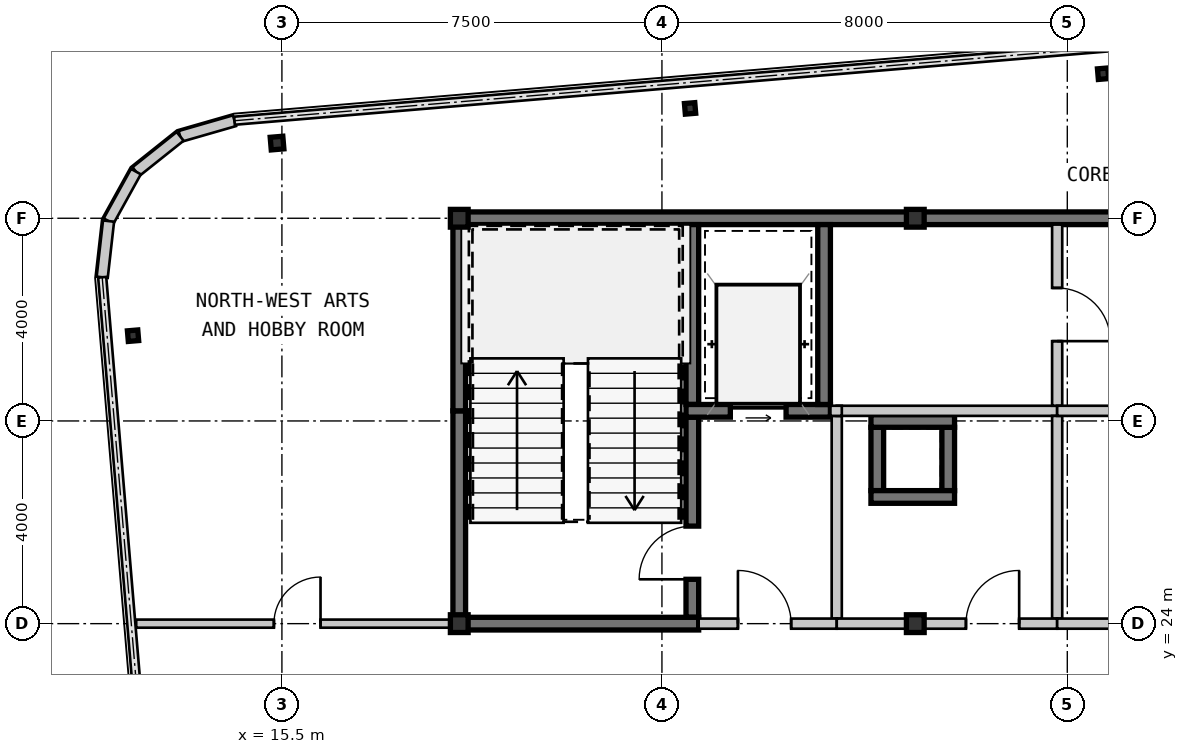
"""IFC4 building model, lengths in metres.
Left out: names, types, materials, properties, quantities, classifications, styles, units other than length and angle.
Written with IfcOpenShell. Run it as: python <this file> out.ifc"""

import sys

from ifc_helpers import new_model, si_unit, direction, frame, frame_2d, origin, origin_2d, place, context, subcontext, project, spatial, rectangle, hollow_rectangle, i_section, extrude, source, transform, mapped, element, fill, save


model = new_model("IFC4")
c1 = context("Model", 3, precision=1e-05, world=origin(), true_north=direction((0.0, 1.0)))
c2 = subcontext(c1, "Body", "Model", "MODEL_VIEW")
j1 = project(units=[si_unit("LENGTHUNIT", "METRE"), si_unit("PLANEANGLEUNIT", "RADIAN")], contexts=[c1])
p1 = place(None, origin())
s1 = spatial("IfcSite", under=j1, at=p1, CompositionType="ELEMENT")
p2 = place(p1, origin())
s2 = spatial("IfcBuilding", under=s1, at=p2, CompositionType="ELEMENT")
p3 = place(p2, frame((0.0, 0.0, 197.75)))
s3 = spatial("IfcBuildingStorey", under=s2, at=p3, CompositionType="ELEMENT", Elevation=197.75)
m1 = source(origin(), c2, "Body", "SweptSolid", [
    extrude(hollow_rectangle(XDim=0.35, YDim=0.35, WallThickness=0.016, at=origin_2d()), origin(), (0.0, 0.0, 1.0), 3.15),
])
for number, where, z_axis, x_axis in (
    (1, (19.0, 24.0, 0.0), (0.0, 0.0, 1.0), (1.0, 0.0, 0.0)),
    (2, (28.0, 24.0, 0.0), (0.0, 0.0, 1.0), (1.0, 0.0, 0.0)),
    (3, (19.0, 32.0, 0.0), (0.0, 0.0, 1.0), (1.0, 0.0, 0.0)),
    (4, (28.0, 32.0, 0.0), (0.0, 0.0, 1.0), (1.0, 0.0, 0.0)),
):
    element("IfcColumn", number, at=place(p3, frame(where, z_axis=z_axis, x_axis=x_axis)), inside=s3, PredefinedType="COLUMN", context=c2, shape_type="MappedRepresentation", body=[
        mapped(m1, transform((0.0, 0.0, 0.0), scale=1.0)),
    ])
m2 = source(origin(), c2, "Body", "SweptSolid", [
    extrude(hollow_rectangle(XDim=0.25, YDim=0.25, WallThickness=0.01, at=origin_2d()), origin(), (0.0, 0.0, 1.0), 3.15),
])
p4 = place(p3, frame((15.404, 33.484, 0.0), z_axis=(0.0, 0.0, 1.0), x_axis=(0.99649285925, 0.083677843332, 0.0)))
e5 = element("IfcColumn", 5, at=p4, inside=s3, PredefinedType="COLUMN", context=c2, shape_type="MappedRepresentation", body=[
    mapped(m2, transform((0.0, 0.0, 0.0), scale=1.0)),
])
m3 = source(origin(), c2, "Body", "SweptSolid", [
    extrude(i_section(OverallWidth=0.205, OverallDepth=0.21, WebThickness=0.009, FlangeThickness=0.014, at=origin_2d()), origin(), (0.0, 0.0, 1.0), 3.15),
])
for number, where, z_axis, x_axis in (
    (6, (23.555, 34.168, 0.0), (0.0, 0.0, 1.0), (0.996, 0.084, 0.0)),
    (7, (31.706, 34.853, 0.0), (0.0, 0.0, 1.0), (0.996, 0.084, 0.0)),
    (8, (12.562, 29.682, 0.0), (0.0, 0.0, 1.0), (0.996, 0.084, 0.0)),
):
    element("IfcColumn", number, at=place(p3, frame(where, z_axis=z_axis, x_axis=x_axis)), inside=s3, PredefinedType="COLUMN", context=c2, shape_type="MappedRepresentation", body=[
        mapped(m3, transform((0.0, 0.0, 0.0), scale=1.0)),
    ])
m4 = source(origin(), c2, "Body", "SweptSolid", [
    extrude(rectangle(XDim=1.116, YDim=0.22, at=frame_2d((0.558, 0.0))), origin(), (0.0, 0.0, 1.0), 2.93),
])
p5 = place(p3, frame((14.564, 33.925, 0.0), z_axis=(0.0, 0.0, 1.0), x_axis=(-0.961010464297, -0.276512002475, 0.0)))
e9 = element("IfcWall", 9, at=p5, inside=s3, PredefinedType="SOLIDWALL", context=c2, shape_type="MappedRepresentation", body=[
    mapped(m4, transform((0.0, 0.0, 0.0), scale=1.0)),
])
m5 = source(origin(), c2, "Body", "SweptSolid", [
    extrude(rectangle(XDim=1.116, YDim=0.22, at=frame_2d((0.558, 0.0))), origin(), (0.0, 0.0, 1.0), 2.93),
])
p6 = place(p3, frame((13.491, 33.616, 0.0), z_axis=(0.0, 0.0, 1.0), x_axis=(-0.782062884215, -0.623199522732, 0.0)))
e10 = element("IfcWall", 10, at=p6, inside=s3, PredefinedType="SOLIDWALL", context=c2, shape_type="MappedRepresentation", body=[
    mapped(m5, transform((0.0, 0.0, 0.0), scale=1.0)),
])
for number, where, z_axis, x_axis in (
    (11, (12.619, 32.921, 0.0), (0.0, 0.0, 1.0), (-0.484, -0.875, 0.0)),
    (12, (12.079, 31.944, 0.0), (0.0, 0.0, 1.0), (-0.112, -0.994, 0.0)),
):
    element("IfcWall", number, at=place(p3, frame(where, z_axis=z_axis, x_axis=x_axis)), inside=s3, PredefinedType="SOLIDWALL", context=c2, shape_type="MappedRepresentation", body=[
        mapped(m4, transform((0.0, 0.0, 0.0), scale=1.0)),
    ])
m6 = source(origin(), c2, "Body", "SweptSolid", [
    extrude(rectangle(XDim=9.125, YDim=0.25, at=frame_2d((4.562, 0.0))), origin(), (0.0, 0.0, 1.0), 2.93),
])
p7 = place(p3, frame((18.875, 32.0, 0.0), z_axis=(0.0, 0.0, 1.0), x_axis=(1.0, 0.0, 0.0)))
e13 = element("IfcWall", 13, at=p7, inside=s3, PredefinedType="SHEAR", context=c2, shape_type="MappedRepresentation", body=[
    mapped(m6, transform((0.0, 0.0, 0.0), scale=1.0)),
])
m7 = source(origin(), c2, "Body", "SweptSolid", [
    extrude(rectangle(XDim=11.2, YDim=0.25, at=frame_2d((5.6, 0.0))), origin(), (0.0, 0.0, 1.0), 2.93),
])
p8 = place(p3, frame((28.0, 32.0, 0.0), z_axis=(0.0, 0.0, 1.0), x_axis=(1.0, 0.0, 0.0)))
e14 = element("IfcWall", 14, at=p8, inside=s3, PredefinedType="SHEAR", context=c2, shape_type="MappedRepresentation", body=[
    mapped(m7, transform((0.0, 0.0, 0.0), scale=1.0)),
])
m8 = source(origin(), c2, "Body", "SweptSolid", [
    extrude(rectangle(XDim=4.075, YDim=0.25, at=frame_2d((2.038, 0.0))), origin(), (0.0, 0.0, 1.0), 2.93),
])
p9 = place(p3, frame((19.0, 24.125, 0.0), z_axis=(0.0, 0.0, 1.0), x_axis=(0.0, 1.0, 0.0)))
e15 = element("IfcWall", 15, at=p9, inside=s3, PredefinedType="SHEAR", context=c2, shape_type="MappedRepresentation", body=[
    mapped(m8, transform((0.0, 0.0, 0.0), scale=1.0)),
])
m9 = source(origin(), c2, "Body", "SweptSolid", [
    extrude(rectangle(XDim=3.675, YDim=0.25, at=frame_2d((1.837, 0.0))), origin(), (0.0, 0.0, 1.0), 2.93),
])
p10 = place(p3, frame((19.0, 28.2, 0.0), z_axis=(0.0, 0.0, 1.0), x_axis=(0.0, 1.0, 0.0)))
e16 = element("IfcWall", 16, at=p10, inside=s3, PredefinedType="SHEAR", context=c2, shape_type="MappedRepresentation", body=[
    mapped(m9, transform((0.0, 0.0, 0.0), scale=1.0)),
])
m10 = source(origin(), c2, "Body", "SweptSolid", [
    extrude(rectangle(XDim=3.55, YDim=0.25, at=frame_2d((1.775, 0.0))), origin(), (0.0, 0.0, 1.0), 2.93),
])
p11 = place(p3, frame((23.6, 28.325, 0.0), z_axis=(0.0, 0.0, 1.0), x_axis=(0.0, 1.0, 0.0)))
e17 = element("IfcWall", 17, at=p11, inside=s3, PredefinedType="SHEAR", context=c2, shape_type="MappedRepresentation", body=[
    mapped(m10, transform((0.0, 0.0, 0.0), scale=1.0)),
])
m11 = source(origin(), c2, "Body", "SweptSolid", [
    extrude(rectangle(XDim=3.95, YDim=0.25, at=frame_2d((1.975, 0.0))), origin(), (0.0, 0.0, 1.0), 2.93),
])
p12 = place(p3, frame((23.6, 24.125, 0.0), z_axis=(0.0, 0.0, 1.0), x_axis=(0.0, 1.0, 0.0)))
e18 = element("IfcWall", 18, at=p12, inside=s3, PredefinedType="SHEAR", context=c2, shape_type="MappedRepresentation", body=[
    mapped(m11, transform((0.0, 0.0, 0.0), scale=1.0)),
])
m12 = source(origin(), c2, "Body", "SweptSolid", [
    extrude(rectangle(XDim=1.05, YDim=2.1, at=frame_2d((0.525, 1.05))), frame((0.0, 0.135, 0.0), z_axis=(0.0, -1.0, 0.0), x_axis=(1.0, 0.0, 0.0)), (0.0, 0.0, 1.0), 0.27),
])
p13 = place(p12, frame((0.75, 0.0, 0.0)))
e19 = element("IfcOpeningElement", 19, at=p13, cuts=e18, PredefinedType="OPENING", context=c2, shape_type="MappedRepresentation", body=[
    mapped(m12, transform((0.0, 0.0, 0.0), scale=1.0)),
])
m13 = source(origin(), c2, "Body", "SweptSolid", [
    extrude(rectangle(XDim=4.85, YDim=0.25, at=frame_2d((2.425, 0.0))), origin(), (0.0, 0.0, 1.0), 2.93),
])
p14 = place(p3, frame((18.875, 24.0, 0.0), z_axis=(0.0, 0.0, 1.0), x_axis=(1.0, 0.0, 0.0)))
e20 = element("IfcWall", 20, at=p14, inside=s3, PredefinedType="SHEAR", context=c2, shape_type="MappedRepresentation", body=[
    mapped(m13, transform((0.0, 0.0, 0.0), scale=1.0)),
])
m14 = source(origin(), c2, "Body", "SweptSolid", [
    extrude(rectangle(XDim=2.85, YDim=0.25, at=frame_2d((1.425, 0.0))), origin(), (0.0, 0.0, 1.0), 2.93),
])
p15 = place(p3, frame((23.475, 28.2, 0.0), z_axis=(0.0, 0.0, 1.0), x_axis=(1.0, 0.0, 0.0)))
e21 = element("IfcWall", 21, at=p15, inside=s3, PredefinedType="SHEAR", context=c2, shape_type="MappedRepresentation", body=[
    mapped(m14, transform((0.0, 0.0, 0.0), scale=1.0)),
])
m15 = source(origin(), c2, "Body", "SweptSolid", [
    extrude(rectangle(XDim=1.1, YDim=2.15, at=frame_2d((0.55, 1.075))), frame((0.0, 0.135, 0.0), z_axis=(0.0, -1.0, 0.0), x_axis=(1.0, 0.0, 0.0)), (0.0, 0.0, 1.0), 0.27),
])
p16 = place(p15, frame((0.875, 0.0, 0.0)))
e22 = element("IfcOpeningElement", 22, at=p16, cuts=e21, PredefinedType="OPENING", context=c2, shape_type="MappedRepresentation", body=[
    mapped(m15, transform((0.0, 0.0, 0.0), scale=1.0)),
])
p17 = place(p3, frame((26.2, 28.325, 0.0), z_axis=(0.0, 0.0, 1.0), x_axis=(0.0, 1.0, 0.0)))
e23 = element("IfcWall", 23, at=p17, inside=s3, PredefinedType="SHEAR", context=c2, shape_type="MappedRepresentation", body=[
    mapped(m10, transform((0.0, 0.0, 0.0), scale=1.0)),
])
m16 = source(origin(), c2, "Body", "SweptSolid", [
    extrude(rectangle(XDim=4.0, YDim=0.2, at=frame_2d((2.0, 0.0))), origin(), (0.0, 0.0, 1.0), 2.93),
])
p18 = place(p3, frame((26.45, 24.1, 0.0), z_axis=(0.0, 0.0, 1.0), x_axis=(0.0, 1.0, 0.0)))
e24 = element("IfcWall", 24, at=p18, inside=s3, PredefinedType="SOLIDWALL", context=c2, shape_type="MappedRepresentation", body=[
    mapped(m16, transform((0.0, 0.0, 0.0), scale=1.0)),
])
m17 = source(origin(), c2, "Body", "SweptSolid", [
    extrude(rectangle(XDim=2.725, YDim=0.2, at=frame_2d((1.362, 0.0))), origin(), (0.0, 0.0, 1.0), 2.47),
])
p19 = place(p3, frame((23.725, 24.0, 0.0), z_axis=(0.0, 0.0, 1.0), x_axis=(1.0, 0.0, 0.0)))
e25 = element("IfcWall", 25, at=p19, inside=s3, PredefinedType="SOLIDWALL", context=c2, shape_type="MappedRepresentation", body=[
    mapped(m17, transform((0.0, 0.0, 0.0), scale=1.0)),
])
m18 = source(origin(), c2, "Body", "SweptSolid", [
    extrude(rectangle(XDim=1.05, YDim=2.1, at=frame_2d((0.525, 1.05))), frame((0.0, 0.11, 0.0), z_axis=(0.0, -1.0, 0.0), x_axis=(1.0, 0.0, 0.0)), (0.0, 0.0, 1.0), 0.22),
])
p20 = place(p19, frame((0.775, 0.0, 0.0)))
e26 = element("IfcOpeningElement", 26, at=p20, cuts=e25, PredefinedType="OPENING", context=c2, shape_type="MappedRepresentation", body=[
    mapped(m18, transform((0.0, 0.0, 0.0), scale=1.0)),
])
m19 = source(origin(), c2, "Body", "SweptSolid", [
    extrude(rectangle(XDim=1.25, YDim=0.25, at=frame_2d((0.625, 0.0))), origin(), (0.0, 0.0, 1.0), 2.93),
])
for number, where, z_axis, x_axis in (
    (27, (28.65, 26.625, 0.0), (0.0, 0.0, 1.0), (0.0, 1.0, 0.0)),
    (28, (27.25, 27.875, 0.0), (0.0, 0.0, 1.0), (0.0, -1.0, 0.0)),
):
    element("IfcWall", number, at=place(p3, frame(where, z_axis=z_axis, x_axis=x_axis)), inside=s3, PredefinedType="SHEAR", context=c2, shape_type="MappedRepresentation", body=[
        mapped(m19, transform((0.0, 0.0, 0.0), scale=1.0)),
    ])
m20 = source(origin(), c2, "Body", "SweptSolid", [
    extrude(rectangle(XDim=1.65, YDim=0.25, at=frame_2d((0.825, 0.0))), origin(), (0.0, 0.0, 1.0), 2.93),
])
for number, where, z_axis, x_axis in (
    (29, (28.775, 28.0, 0.0), (0.0, 0.0, 1.0), (-1.0, 0.0, 0.0)),
    (30, (27.125, 26.5, 0.0), (0.0, 0.0, 1.0), (1.0, 0.0, 0.0)),
):
    element("IfcWall", number, at=place(p3, frame(where, z_axis=z_axis, x_axis=x_axis)), inside=s3, PredefinedType="SHEAR", context=c2, shape_type="MappedRepresentation", body=[
        mapped(m20, transform((0.0, 0.0, 0.0), scale=1.0)),
    ])
m21 = source(origin(), c2, "Body", "SweptSolid", [
    extrude(rectangle(XDim=4.35, YDim=0.2, at=frame_2d((2.175, 0.0))), origin(), (0.0, 0.0, 1.0), 2.93),
])
p21 = place(p3, frame((26.45, 28.2, 0.0), z_axis=(0.0, 0.0, 1.0), x_axis=(1.0, 0.0, 0.0)))
e31 = element("IfcWall", 31, at=p21, inside=s3, PredefinedType="SOLIDWALL", context=c2, shape_type="MappedRepresentation", body=[
    mapped(m21, transform((0.0, 0.0, 0.0), scale=1.0)),
])
p22 = place(p3, frame((30.8, 28.1, 0.0), z_axis=(0.0, 0.0, 1.0), x_axis=(0.0, -1.0, 0.0)))
e32 = element("IfcWall", 32, at=p22, inside=s3, PredefinedType="SOLIDWALL", context=c2, shape_type="MappedRepresentation", body=[
    mapped(m16, transform((0.0, 0.0, 0.0), scale=1.0)),
])
m22 = source(origin(), c2, "Body", "SweptSolid", [
    extrude(rectangle(XDim=4.35, YDim=0.2, at=frame_2d((2.175, 0.0))), origin(), (0.0, 0.0, 1.0), 2.47),
])
p23 = place(p3, frame((30.8, 24.0, 0.0), z_axis=(0.0, 0.0, 1.0), x_axis=(-1.0, 0.0, 0.0)))
e33 = element("IfcWall", 33, at=p23, inside=s3, PredefinedType="SOLIDWALL", context=c2, shape_type="MappedRepresentation", body=[
    mapped(m22, transform((0.0, 0.0, 0.0), scale=1.0)),
])
p24 = place(p23, frame((0.75, 0.0, 0.0)))
e34 = element("IfcOpeningElement", 34, at=p24, cuts=e33, PredefinedType="OPENING", context=c2, shape_type="MappedRepresentation", body=[
    mapped(m18, transform((0.0, 0.0, 0.0), scale=1.0)),
])
m23 = source(origin(), c2, "Body", "SweptSolid", [
    extrude(rectangle(XDim=3.575, YDim=0.2, at=frame_2d((1.788, 0.0))), origin(), (0.0, 0.0, 1.0), 2.93),
])
p25 = place(p3, frame((30.8, 31.875, 0.0), z_axis=(0.0, 0.0, 1.0), x_axis=(0.0, -1.0, 0.0)))
e35 = element("IfcWall", 35, at=p25, inside=s3, PredefinedType="SOLIDWALL", context=c2, shape_type="MappedRepresentation", body=[
    mapped(m23, transform((0.0, 0.0, 0.0), scale=1.0)),
])
p26 = place(p25, frame((1.25, 0.0, 0.0)))
e36 = element("IfcOpeningElement", 36, at=p26, cuts=e35, PredefinedType="OPENING", context=c2, shape_type="MappedRepresentation", body=[
    mapped(m18, transform((0.0, 0.0, 0.0), scale=1.0)),
])
m24 = source(origin(), c2, "Body", "SweptSolid", [
    extrude(rectangle(XDim=4.35, YDim=0.2, at=frame_2d((2.175, 0.0))), origin(), (0.0, 0.0, 1.0), 2.93),
])
p27 = place(p3, frame((30.8, 28.2, 0.0), z_axis=(0.0, 0.0, 1.0), x_axis=(1.0, 0.0, 0.0)))
e37 = element("IfcWall", 37, at=p27, inside=s3, PredefinedType="SOLIDWALL", context=c2, shape_type="MappedRepresentation", body=[
    mapped(m24, transform((0.0, 0.0, 0.0), scale=1.0)),
])
p28 = place(p27, frame((2.88, 0.0, 0.0)))
e38 = element("IfcOpeningElement", 38, at=p28, cuts=e37, PredefinedType="OPENING", context=c2, shape_type="MappedRepresentation", body=[
    mapped(m18, transform((0.0, 0.0, 0.0), scale=1.0)),
])
m25 = source(origin(), c2, "Body", "SweptSolid", [
    extrude(rectangle(XDim=4.35, YDim=0.2, at=frame_2d((2.175, 0.0))), origin(), (0.0, 0.0, 1.0), 2.47),
])
p29 = place(p3, frame((35.15, 24.0, 0.0), z_axis=(0.0, 0.0, 1.0), x_axis=(-1.0, 0.0, 0.0)))
e39 = element("IfcWall", 39, at=p29, inside=s3, PredefinedType="SOLIDWALL", context=c2, shape_type="MappedRepresentation", body=[
    mapped(m25, transform((0.0, 0.0, 0.0), scale=1.0)),
])
p30 = place(p29, frame((1.65, 0.0, 0.0)))
e40 = element("IfcOpeningElement", 40, at=p30, cuts=e39, PredefinedType="OPENING", context=c2, shape_type="MappedRepresentation", body=[
    mapped(m18, transform((0.0, 0.0, 0.0), scale=1.0)),
])
m26 = source(origin(), c2, "Body", "SweptSolid", [
    extrude(rectangle(XDim=6.251, YDim=0.16, at=frame_2d((3.125, 0.0))), origin(), (0.0, 0.0, 1.0), 2.93),
])
p31 = place(p3, frame((12.624, 24.0, 0.0), z_axis=(0.0, 0.0, 1.0), x_axis=(1.0, 0.0, 0.0)))
e41 = element("IfcWall", 41, at=p31, inside=s3, PredefinedType="PARTITIONING", context=c2, shape_type="MappedRepresentation", body=[
    mapped(m26, transform((0.0, 0.0, 0.0), scale=1.0)),
])
m27 = source(origin(), c2, "Body", "SweptSolid", [
    extrude(rectangle(XDim=0.92, YDim=2.1, at=frame_2d((0.46, 1.05))), frame((0.0, 0.09, 0.0), z_axis=(0.0, -1.0, 0.0), x_axis=(1.0, 0.0, 0.0)), (0.0, 0.0, 1.0), 0.18),
])
p32 = place(p31, frame((2.718, 0.0, 0.0)))
e42 = element("IfcOpeningElement", 42, at=p32, cuts=e41, PredefinedType="OPENING", context=c2, shape_type="MappedRepresentation", body=[
    mapped(m27, transform((0.0, 0.0, 0.0), scale=1.0)),
])
m28 = source(origin(), c2, "Body", "SweptSolid", [
    extrude(rectangle(XDim=0.225, YDim=0.2, at=frame_2d((0.113, 0.0))), origin(), (0.0, 0.0, 1.0), 2.93),
])
p33 = place(p3, frame((26.325, 28.2, 0.0), z_axis=(0.0, 0.0, 1.0), x_axis=(1.0, 0.0, 0.0)))
e43 = element("IfcWall", 43, at=p33, inside=s3, PredefinedType="SOLIDWALL", context=c2, shape_type="MappedRepresentation", body=[
    mapped(m28, transform((0.0, 0.0, 0.0), scale=1.0)),
])
m29 = source(origin(), c2, "Body", "SweptSolid", [
    extrude(rectangle(XDim=1.05, YDim=2.1, at=frame_2d((0.525, 1.05))), frame((0.0, 0.025, 0.0), z_axis=(0.0, -1.0, 0.0), x_axis=(1.0, 0.0, 0.0)), (0.0, 0.0, 1.0), 0.05),
])
p34 = place(p13, origin())
e44 = element("IfcDoor", 44, at=p34, inside=s3, OperationType="SINGLE_SWING_LEFT", PredefinedType="DOOR", context=c2, shape_type="MappedRepresentation", body=[
    mapped(m29, transform((0.0, 0.0, 0.0), scale=1.0)),
])
fill(e19, e44)
m30 = source(origin(), c2, "Body", "SweptSolid", [
    extrude(rectangle(XDim=1.1, YDim=2.15, at=frame_2d((0.55, 1.075))), frame((0.0, 0.025, 0.0), z_axis=(0.0, -1.0, 0.0), x_axis=(1.0, 0.0, 0.0)), (0.0, 0.0, 1.0), 0.05),
])
p35 = place(p16, origin())
e45 = element("IfcDoor", 45, at=p35, inside=s3, OperationType="SLIDING_TO_LEFT", PredefinedType="DOOR", context=c2, shape_type="MappedRepresentation", body=[
    mapped(m30, transform((0.0, 0.0, 0.0), scale=1.0)),
])
fill(e22, e45)
p36 = place(p20, origin())
e46 = element("IfcDoor", 46, at=p36, inside=s3, OperationType="SINGLE_SWING_LEFT", PredefinedType="DOOR", context=c2, shape_type="MappedRepresentation", body=[
    mapped(m29, transform((0.0, 0.0, 0.0), scale=1.0)),
])
fill(e26, e46)
p37 = place(p24, frame((1.05, 0.0, 0.0), z_axis=(0.0, 0.0, 1.0), x_axis=(-1.0, 0.0, 0.0)))
e47 = element("IfcDoor", 47, at=p37, inside=s3, OperationType="SINGLE_SWING_RIGHT", PredefinedType="DOOR", context=c2, shape_type="MappedRepresentation", body=[
    mapped(m29, transform((0.0, 0.0, 0.0), scale=1.0)),
])
fill(e34, e47)
p38 = place(p26, origin())
e48 = element("IfcDoor", 48, at=p38, inside=s3, OperationType="SINGLE_SWING_RIGHT", PredefinedType="DOOR", context=c2, shape_type="MappedRepresentation", body=[
    mapped(m29, transform((0.0, 0.0, 0.0), scale=1.0)),
])
fill(e36, e48)
m31 = source(origin(), c2, "Body", "SweptSolid", [
    extrude(rectangle(XDim=0.92, YDim=2.1, at=frame_2d((0.46, 1.05))), frame((0.0, 0.025, 0.0), z_axis=(0.0, -1.0, 0.0), x_axis=(1.0, 0.0, 0.0)), (0.0, 0.0, 1.0), 0.05),
])
p39 = place(p32, origin())
e49 = element("IfcDoor", 49, at=p39, inside=s3, OperationType="SINGLE_SWING_RIGHT", PredefinedType="DOOR", context=c2, shape_type="MappedRepresentation", body=[
    mapped(m31, transform((0.0, 0.0, 0.0), scale=1.0)),
])
fill(e42, e49)
save(model, sys.argv[1])
